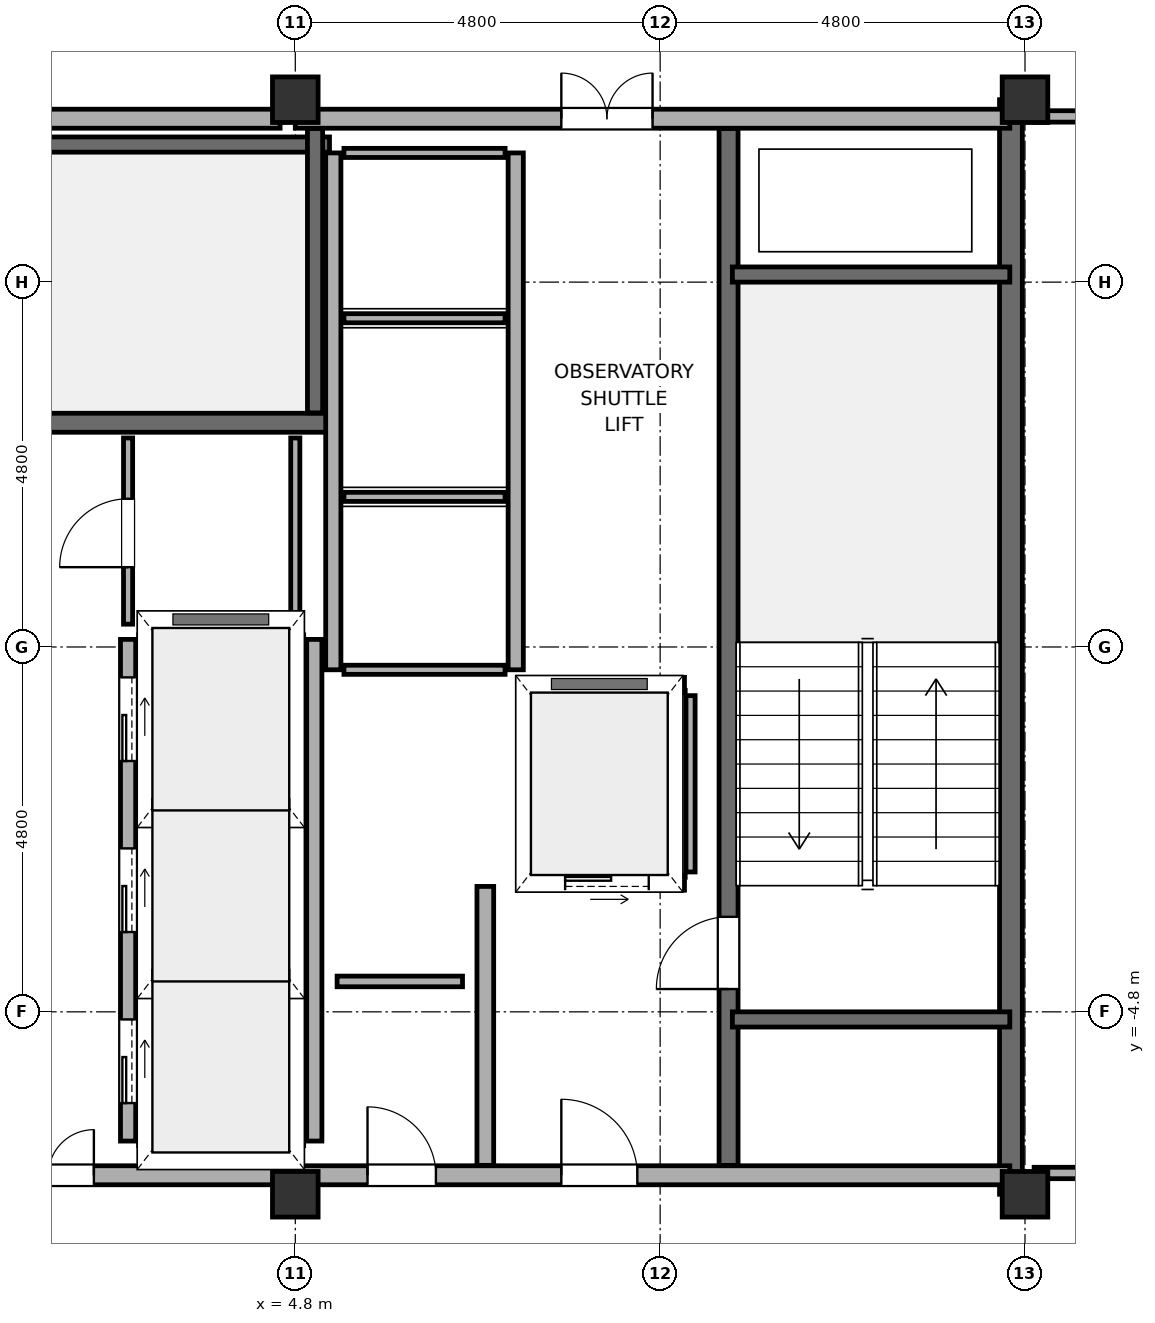
"""IFC4 building model, lengths in metres.
Left out: names, types, materials, properties, quantities, classifications, styles, units other than length and angle.
Written with IfcOpenShell. Run it as: python <this file> out.ifc"""

import sys

from ifc_helpers import new_model, si_unit, direction, frame, frame_2d, origin, origin_2d, place, context, subcontext, project, spatial, rectangle, hollow_rectangle, extrude, element, fill, save


model = new_model("IFC4")
c1 = context("Model", 3, precision=1e-05, world=origin(), true_north=direction((0.0, 1.0)))
c2 = subcontext(c1, "Body", "Model", "MODEL_VIEW")
j1 = project(units=[si_unit("LENGTHUNIT", "METRE"), si_unit("PLANEANGLEUNIT", "RADIAN")], contexts=[c1])
p1 = place(None, origin())
s1 = spatial("IfcSite", under=j1, at=p1, CompositionType="ELEMENT")
p2 = place(p1, origin())
s2 = spatial("IfcBuilding", under=s1, at=p2, CompositionType="ELEMENT")
p3 = place(p2, frame((0.0, 0.0, 249.25)))
s3 = spatial("IfcBuildingStorey", under=s2, at=p3, CompositionType="ELEMENT", Elevation=249.25)
for number, where, z_axis, x_axis in (
    (1, (4.8, -7.2, 0.0), (0.0, 0.0, 1.0), (1.0, 0.0, 0.0)),
    (2, (4.8, 7.2, 0.0), (0.0, 0.0, 1.0), (1.0, 0.0, 0.0)),
    (3, (14.4, -7.2, 0.0), (0.0, 0.0, 1.0), (1.0, 0.0, 0.0)),
    (4, (14.4, 7.2, 0.0), (0.0, 0.0, 1.0), (1.0, 0.0, 0.0)),
):
    element("IfcColumn", number, at=place(p3, frame(where, z_axis=z_axis, x_axis=x_axis)), inside=s3, PredefinedType="COLUMN", context=c2, shape_type="SweptSolid", body=[
        extrude(hollow_rectangle(XDim=0.6, YDim=0.6, WallThickness=0.028, at=origin_2d()), origin(), (0.0, 0.0, 1.0), 3.85),
    ])
p4 = place(p3, frame((14.215, -7.2, -0.18), z_axis=(0.0, 0.0, 1.0), x_axis=(0.0, 1.0, 0.0)))
e5 = element("IfcWall", 5, at=p4, inside=s3, PredefinedType="SHEAR", context=c2, shape_type="SweptSolid", body=[
    extrude(rectangle(XDim=14.4, YDim=0.3, at=frame_2d((7.2, 0.0))), origin(), (0.0, 0.0, 1.0), 3.85),
])
p5 = place(p3, frame((-4.6, -6.95, 0.0), z_axis=(0.0, 0.0, 1.0), x_axis=(1.0, 0.0, 0.0)))
e6 = element("IfcWall", 6, at=p5, inside=s3, PredefinedType="SOLIDWALL", context=c2, shape_type="SweptSolid", body=[
    extrude(rectangle(XDim=9.2, YDim=0.25, at=frame_2d((4.6, 0.0))), origin(), (0.0, 0.0, 1.0), 2.47),
])
p6 = place(p5, frame((0.8, 0.0, 0.0)))
e7 = element("IfcOpeningElement", 7, at=p6, cuts=e6, PredefinedType="OPENING", context=c2, shape_type="SweptSolid", body=[
    extrude(rectangle(XDim=1.2, YDim=2.2, at=frame_2d((0.6, 1.1))), frame((0.0, 0.14, 0.0), z_axis=(0.0, -1.0, 0.0), x_axis=(1.0, 0.0, 0.0)), (0.0, 0.0, 1.0), 0.28),
])
p7 = place(p5, frame((5.55, 0.0, 0.0)))
e8 = element("IfcOpeningElement", 8, at=p7, cuts=e6, PredefinedType="OPENING", context=c2, shape_type="SweptSolid", body=[
    extrude(rectangle(XDim=1.2, YDim=2.2, at=frame_2d((0.6, 1.1))), frame((0.0, 0.14, 0.0), z_axis=(0.0, -1.0, 0.0), x_axis=(1.0, 0.0, 0.0)), (0.0, 0.0, 1.0), 0.28),
])
p8 = place(p3, frame((4.8, -6.95, 0.0), z_axis=(0.0, 0.0, 1.0), x_axis=(1.0, 0.0, 0.0)))
e9 = element("IfcWall", 9, at=p8, inside=s3, PredefinedType="SOLIDWALL", context=c2, shape_type="SweptSolid", body=[
    extrude(rectangle(XDim=9.4, YDim=0.25, at=frame_2d((4.7, 0.0))), origin(), (0.0, 0.0, 1.0), 2.27),
])
p9 = place(p8, frame((3.5, 0.0, 0.0)))
e10 = element("IfcOpeningElement", 10, at=p9, cuts=e9, PredefinedType="OPENING", context=c2, shape_type="SweptSolid", body=[
    extrude(rectangle(XDim=1.0, YDim=2.15, at=frame_2d((0.5, 1.075))), frame((0.0, 0.14, 0.0), z_axis=(0.0, -1.0, 0.0), x_axis=(1.0, 0.0, 0.0)), (0.0, 0.0, 1.0), 0.28),
])
p10 = place(p8, frame((0.95, 0.0, 0.0)))
e11 = element("IfcOpeningElement", 11, at=p10, cuts=e9, PredefinedType="OPENING", context=c2, shape_type="SweptSolid", body=[
    extrude(rectangle(XDim=0.9, YDim=2.1, at=frame_2d((0.45, 1.05))), frame((0.0, 0.14, 0.0), z_axis=(0.0, -1.0, 0.0), x_axis=(1.0, 0.0, 0.0)), (0.0, 0.0, 1.0), 0.28),
])
p11 = place(p3, frame((-4.6, 6.95, 0.0), z_axis=(0.0, 0.0, 1.0), x_axis=(1.0, 0.0, 0.0)))
e12 = element("IfcWall", 12, at=p11, inside=s3, PredefinedType="SOLIDWALL", context=c2, shape_type="SweptSolid", body=[
    extrude(rectangle(XDim=9.2, YDim=0.25, at=frame_2d((4.6, 0.0))), origin(), (0.0, 0.0, 1.0), 2.27),
])
p12 = place(p3, frame((4.8, 6.95, 0.0), z_axis=(0.0, 0.0, 1.0), x_axis=(1.0, 0.0, 0.0)))
e13 = element("IfcWall", 13, at=p12, inside=s3, PredefinedType="SOLIDWALL", context=c2, shape_type="SweptSolid", body=[
    extrude(rectangle(XDim=9.4, YDim=0.25, at=frame_2d((4.7, 0.0))), origin(), (0.0, 0.0, 1.0), 2.27),
])
p13 = place(p12, frame((3.5, 0.0, 0.0)))
e14 = element("IfcOpeningElement", 14, at=p13, cuts=e13, PredefinedType="OPENING", context=c2, shape_type="SweptSolid", body=[
    extrude(rectangle(XDim=1.2, YDim=2.2, at=frame_2d((0.6, 1.1))), frame((0.0, 0.14, 0.0), z_axis=(0.0, -1.0, 0.0), x_axis=(1.0, 0.0, 0.0)), (0.0, 0.0, 1.0), 0.28),
])
p14 = place(p3, frame((7.3, -6.82, 0.0), z_axis=(0.0, 0.0, 1.0), x_axis=(0.0, 1.0, 0.0)))
e15 = element("IfcWall", 15, at=p14, inside=s3, PredefinedType="SOLIDWALL", context=c2, shape_type="SweptSolid", body=[
    extrude(rectangle(XDim=3.67, YDim=0.22, at=frame_2d((1.835, 0.0))), origin(), (0.0, 0.0, 1.0), 2.27),
])
p15 = place(p3, frame((10.5, -6.82, -0.18), z_axis=(0.0, 0.0, 1.0), x_axis=(0.0, 1.0, 0.0)))
e16 = element("IfcWall", 16, at=p15, inside=s3, PredefinedType="SOLIDWALL", context=c2, shape_type="SweptSolid", body=[
    extrude(rectangle(XDim=13.64, YDim=0.25, at=frame_2d((6.82, 0.0))), origin(), (0.0, 0.0, 1.0), 3.85),
])
p16 = place(p15, frame((2.32, 0.0, 0.18)))
e17 = element("IfcOpeningElement", 17, at=p16, cuts=e16, PredefinedType="OPENING", context=c2, shape_type="SweptSolid", body=[
    extrude(rectangle(XDim=0.95, YDim=2.15, at=frame_2d((0.475, 1.075))), frame((0.0, 0.14, 0.0), z_axis=(0.0, -1.0, 0.0), x_axis=(1.0, 0.0, 0.0)), (0.0, 0.0, 1.0), 0.28),
])
for number, where, z_axis, x_axis in (
    (18, (10.55, -4.9, -0.18), (0.0, 0.0, 1.0), (1.0, 0.0, 0.0)),
    (19, (10.55, 4.9, -0.18), (0.0, 0.0, 1.0), (1.0, 0.0, 0.0)),
):
    element("IfcWall", number, at=place(p3, frame(where, z_axis=z_axis, x_axis=x_axis)), inside=s3, PredefinedType="SOLIDWALL", context=c2, shape_type="SweptSolid", body=[
        extrude(rectangle(XDim=3.65, YDim=0.2, at=frame_2d((1.825, 0.0))), origin(), (0.0, 0.0, 1.0), 3.85),
    ])
p17 = place(p3, frame((-4.65, 2.95, -0.18), z_axis=(0.0, 0.0, 1.0), x_axis=(1.0, 0.0, 0.0)))
e20 = element("IfcWall", 20, at=p17, inside=s3, PredefinedType="SOLIDWALL", context=c2, shape_type="SweptSolid", body=[
    extrude(rectangle(XDim=9.9, YDim=0.25, at=frame_2d((4.95, 0.0))), origin(), (0.0, 0.0, 1.0), 3.85),
])
p18 = place(p17, frame((0.65, 0.0, 0.18)))
e21 = element("IfcOpeningElement", 21, at=p18, cuts=e20, PredefinedType="OPENING", context=c2, shape_type="SweptSolid", body=[
    extrude(rectangle(XDim=0.95, YDim=2.15, at=frame_2d((0.475, 1.075))), frame((0.0, 0.14, 0.0), z_axis=(0.0, -1.0, 0.0), x_axis=(1.0, 0.0, 0.0)), (0.0, 0.0, 1.0), 0.28),
])
p19 = place(p3, frame((-4.65, 6.61, -0.18), z_axis=(0.0, 0.0, 1.0), x_axis=(1.0, 0.0, 0.0)))
e22 = element("IfcWall", 22, at=p19, inside=s3, PredefinedType="SOLIDWALL", context=c2, shape_type="SweptSolid", body=[
    extrude(rectangle(XDim=9.9, YDim=0.2, at=frame_2d((4.95, 0.0))), origin(), (0.0, 0.0, 1.0), 3.85),
])
p20 = place(p3, frame((5.06, 3.08, -0.18), z_axis=(0.0, 0.0, 1.0), x_axis=(0.0, 1.0, 0.0)))
e23 = element("IfcWall", 23, at=p20, inside=s3, PredefinedType="SOLIDWALL", context=c2, shape_type="SweptSolid", body=[
    extrude(rectangle(XDim=3.74, YDim=0.2, at=frame_2d((1.87, 0.0))), origin(), (0.0, 0.0, 1.0), 3.85),
])
p21 = place(p3, frame((2.6, -6.5, 0.0), z_axis=(0.0, 0.0, 1.0), x_axis=(0.0, 1.0, 0.0)))
e24 = element("IfcWall", 24, at=p21, inside=s3, PredefinedType="SOLIDWALL", context=c2, shape_type="SweptSolid", body=[
    extrude(rectangle(XDim=6.6, YDim=0.2, at=frame_2d((3.3, 0.0))), origin(), (0.0, 0.0, 1.0), 3.67),
])
p22 = place(p21, frame((0.5, 0.0, 0.0)))
e25 = element("IfcOpeningElement", 25, at=p22, cuts=e24, PredefinedType="OPENING", context=c2, shape_type="SweptSolid", body=[
    extrude(rectangle(XDim=1.1, YDim=2.2, at=frame_2d((0.55, 1.1))), frame((0.0, 0.115, 0.0), z_axis=(0.0, -1.0, 0.0), x_axis=(1.0, 0.0, 0.0)), (0.0, 0.0, 1.0), 0.23),
])
p23 = place(p21, frame((2.75, 0.0, 0.0)))
e26 = element("IfcOpeningElement", 26, at=p23, cuts=e24, PredefinedType="OPENING", context=c2, shape_type="SweptSolid", body=[
    extrude(rectangle(XDim=1.1, YDim=2.2, at=frame_2d((0.55, 1.1))), frame((0.0, 0.115, 0.0), z_axis=(0.0, -1.0, 0.0), x_axis=(1.0, 0.0, 0.0)), (0.0, 0.0, 1.0), 0.23),
])
p24 = place(p21, frame((5.0, 0.0, 0.0)))
e27 = element("IfcOpeningElement", 27, at=p24, cuts=e24, PredefinedType="OPENING", context=c2, shape_type="SweptSolid", body=[
    extrude(rectangle(XDim=1.1, YDim=2.2, at=frame_2d((0.55, 1.1))), frame((0.0, 0.115, 0.0), z_axis=(0.0, -1.0, 0.0), x_axis=(1.0, 0.0, 0.0)), (0.0, 0.0, 1.0), 0.23),
])
p25 = place(p3, frame((5.05, -6.5, 0.0), z_axis=(0.0, 0.0, 1.0), x_axis=(0.0, 1.0, 0.0)))
e28 = element("IfcWall", 28, at=p25, inside=s3, PredefinedType="SOLIDWALL", context=c2, shape_type="SweptSolid", body=[
    extrude(rectangle(XDim=6.6, YDim=0.2, at=frame_2d((3.3, 0.0))), origin(), (0.0, 0.0, 1.0), 3.67),
])
for number, where, z_axis, x_axis in (
    (29, (2.74, -6.5, 0.0), (0.0, 0.0, 1.0), (1.0, 0.0, 0.0)),
    (30, (2.74, -4.325, 0.0), (0.0, 0.0, 1.0), (1.0, 0.0, 0.0)),
    (31, (2.74, -2.075, 0.0), (0.0, 0.0, 1.0), (1.0, 0.0, 0.0)),
    (32, (2.74, 0.1, 0.0), (0.0, 0.0, 1.0), (1.0, 0.0, 0.0)),
):
    element("IfcWall", number, at=place(p3, frame(where, z_axis=z_axis, x_axis=x_axis)), inside=s3, PredefinedType="PARTITIONING", context=c2, shape_type="SweptSolid", body=[
        extrude(rectangle(XDim=2.17, YDim=0.12, at=frame_2d((1.085, 0.0))), origin(), (0.0, 0.0, 1.0), 3.67),
    ])
for number, where, z_axis, x_axis in (
    (33, (7.7, -0.3, 0.0), (0.0, 0.0, 1.0), (0.0, 1.0, 0.0)),
    (34, (5.3, -0.3, 0.0), (0.0, 0.0, 1.0), (0.0, 1.0, 0.0)),
):
    element("IfcWall", number, at=place(p3, frame(where, z_axis=z_axis, x_axis=x_axis)), inside=s3, PredefinedType="SOLIDWALL", context=c2, shape_type="SweptSolid", body=[
        extrude(rectangle(XDim=6.8, YDim=0.2, at=frame_2d((3.4, 0.0))), origin(), (0.0, 0.0, 1.0), 3.67),
    ])
for number, where, z_axis, x_axis in (
    (35, (5.44, -0.3, 0.0), (0.0, 0.0, 1.0), (1.0, 0.0, 0.0)),
    (36, (5.44, 1.975, 0.0), (0.0, 0.0, 1.0), (1.0, 0.0, 0.0)),
    (37, (5.44, 4.325, 0.0), (0.0, 0.0, 1.0), (1.0, 0.0, 0.0)),
    (38, (5.44, 6.5, 0.0), (0.0, 0.0, 1.0), (1.0, 0.0, 0.0)),
):
    element("IfcWall", number, at=place(p3, frame(where, z_axis=z_axis, x_axis=x_axis)), inside=s3, PredefinedType="PARTITIONING", context=c2, shape_type="SweptSolid", body=[
        extrude(rectangle(XDim=2.12, YDim=0.12, at=frame_2d((1.06, 0.0))), origin(), (0.0, 0.0, 1.0), 3.67),
    ])
p26 = place(p3, frame((7.88, -3.1, 0.0), z_axis=(0.0, 0.0, 1.0), x_axis=(1.0, 0.0, 0.0)))
e39 = element("IfcWall", 39, at=p26, inside=s3, PredefinedType="SOLIDWALL", context=c2, shape_type="SweptSolid", body=[
    extrude(rectangle(XDim=2.04, YDim=0.2, at=frame_2d((1.02, 0.0))), origin(), (0.0, 0.0, 1.0), 3.67),
])
p27 = place(p26, frame((0.47, 0.0, 0.0)))
e40 = element("IfcOpeningElement", 40, at=p27, cuts=e39, PredefinedType="OPENING", context=c2, shape_type="SweptSolid", body=[
    extrude(rectangle(XDim=1.1, YDim=2.2, at=frame_2d((0.55, 1.1))), frame((0.0, 0.115, 0.0), z_axis=(0.0, -1.0, 0.0), x_axis=(1.0, 0.0, 0.0)), (0.0, 0.0, 1.0), 0.23),
])
p28 = place(p3, frame((7.88, -0.5, 0.0), z_axis=(0.0, 0.0, 1.0), x_axis=(1.0, 0.0, 0.0)))
e41 = element("IfcWall", 41, at=p28, inside=s3, PredefinedType="SOLIDWALL", context=c2, shape_type="SweptSolid", body=[
    extrude(rectangle(XDim=2.04, YDim=0.2, at=frame_2d((1.02, 0.0))), origin(), (0.0, 0.0, 1.0), 3.67),
])
for number, where, z_axis, x_axis in (
    (42, (7.8, -2.96, 0.0), (0.0, 0.0, 1.0), (0.0, 1.0, 0.0)),
    (43, (10.0, -2.96, 0.0), (0.0, 0.0, 1.0), (0.0, 1.0, 0.0)),
):
    element("IfcWall", number, at=place(p3, frame(where, z_axis=z_axis, x_axis=x_axis)), inside=s3, PredefinedType="PARTITIONING", context=c2, shape_type="SweptSolid", body=[
        extrude(rectangle(XDim=2.32, YDim=0.12, at=frame_2d((1.16, 0.0))), origin(), (0.0, 0.0, 1.0), 3.67),
    ])
p29 = place(p3, frame((14.52, -6.92, 0.0), z_axis=(0.0, 0.0, 1.0), x_axis=(1.0, 0.0, 0.0)))
e44 = element("IfcWall", 44, at=p29, inside=s3, PredefinedType="PARTITIONING", context=c2, shape_type="SweptSolid", body=[
    extrude(rectangle(XDim=9.4, YDim=0.15, at=frame_2d((4.7, 0.0))), origin(), (0.0, 0.0, 1.0), 2.27),
])
p30 = place(p3, frame((5.35, -4.4, 0.0), z_axis=(0.0, 0.0, 1.0), x_axis=(1.0, 0.0, 0.0)))
e45 = element("IfcWall", 45, at=p30, inside=s3, PredefinedType="PLUMBINGWALL", context=c2, shape_type="SweptSolid", body=[
    extrude(rectangle(XDim=1.65, YDim=0.14, at=frame_2d((0.825, 0.0))), origin(), (0.0, 0.0, 1.0), 3.67),
])
p31 = place(p3, frame((14.52, 6.98, 0.0), z_axis=(0.0, 0.0, 1.0), x_axis=(1.0, 0.0, 0.0)))
e46 = element("IfcWall", 46, at=p31, inside=s3, PredefinedType="PARTITIONING", context=c2, shape_type="SweptSolid", body=[
    extrude(rectangle(XDim=9.4, YDim=0.15, at=frame_2d((4.7, 0.0))), origin(), (0.0, 0.0, 1.0), 2.27),
])
p32 = place(p3, frame((2.6, 0.3, 0.0), z_axis=(0.0, 0.0, 1.0), x_axis=(0.0, 1.0, 0.0)))
e47 = element("IfcWall", 47, at=p32, inside=s3, PredefinedType="PARTITIONING", context=c2, shape_type="SweptSolid", body=[
    extrude(rectangle(XDim=2.45, YDim=0.12, at=frame_2d((1.225, 0.0))), origin(), (0.0, 0.0, 1.0), 3.67),
])
p33 = place(p32, frame((0.75, 0.0, 0.0)))
e48 = element("IfcOpeningElement", 48, at=p33, cuts=e47, PredefinedType="OPENING", context=c2, shape_type="SweptSolid", body=[
    extrude(rectangle(XDim=0.9, YDim=2.1, at=frame_2d((0.45, 1.05))), frame((0.0, 0.075, 0.0), z_axis=(0.0, -1.0, 0.0), x_axis=(1.0, 0.0, 0.0)), (0.0, 0.0, 1.0), 0.15),
])
p34 = place(p3, frame((4.8, 0.3, 0.0), z_axis=(0.0, 0.0, 1.0), x_axis=(0.0, 1.0, 0.0)))
e49 = element("IfcWall", 49, at=p34, inside=s3, PredefinedType="PARTITIONING", context=c2, shape_type="SweptSolid", body=[
    extrude(rectangle(XDim=2.45, YDim=0.12, at=frame_2d((1.225, 0.0))), origin(), (0.0, 0.0, 1.0), 3.67),
])
p35 = place(p9, origin())
e50 = element("IfcDoor", 50, at=p35, inside=s3, OperationType="SINGLE_SWING_RIGHT", PredefinedType="DOOR", context=c2, shape_type="SweptSolid", body=[
    extrude(rectangle(XDim=1.0, YDim=2.15, at=frame_2d((0.5, 1.075))), frame((0.0, 0.025, 0.0), z_axis=(0.0, -1.0, 0.0), x_axis=(1.0, 0.0, 0.0)), (0.0, 0.0, 1.0), 0.05),
])
fill(e10, e50)
p36 = place(p7, origin())
e51 = element("IfcDoor", 51, at=p36, inside=s3, OperationType="DOUBLE_DOOR_SINGLE_SWING", PredefinedType="DOOR", context=c2, shape_type="SweptSolid", body=[
    extrude(rectangle(XDim=1.2, YDim=2.2, at=frame_2d((0.6, 1.1))), frame((0.0, 0.025, 0.0), z_axis=(0.0, -1.0, 0.0), x_axis=(1.0, 0.0, 0.0)), (0.0, 0.0, 1.0), 0.05),
])
fill(e8, e51)
p37 = place(p13, origin())
e52 = element("IfcDoor", 52, at=p37, inside=s3, OperationType="DOUBLE_DOOR_SINGLE_SWING", PredefinedType="DOOR", context=c2, shape_type="SweptSolid", body=[
    extrude(rectangle(XDim=1.2, YDim=2.2, at=frame_2d((0.6, 1.1))), frame((0.0, 0.025, 0.0), z_axis=(0.0, -1.0, 0.0), x_axis=(1.0, 0.0, 0.0)), (0.0, 0.0, 1.0), 0.05),
])
fill(e14, e52)
p38 = place(p16, origin())
e53 = element("IfcDoor", 53, at=p38, inside=s3, OperationType="SINGLE_SWING_LEFT", PredefinedType="DOOR", context=c2, shape_type="SweptSolid", body=[
    extrude(rectangle(XDim=0.95, YDim=2.15, at=frame_2d((0.475, 1.075))), frame((0.0, 0.025, 0.0), z_axis=(0.0, -1.0, 0.0), x_axis=(1.0, 0.0, 0.0)), (0.0, 0.0, 1.0), 0.05),
])
fill(e17, e53)
p39 = place(p22, origin())
e54 = element("IfcDoor", 54, at=p39, inside=s3, OperationType="SLIDING_TO_LEFT", PredefinedType="DOOR", context=c2, shape_type="SweptSolid", body=[
    extrude(rectangle(XDim=1.1, YDim=2.2, at=frame_2d((0.55, 1.1))), frame((0.0, 0.025, 0.0), z_axis=(0.0, -1.0, 0.0), x_axis=(1.0, 0.0, 0.0)), (0.0, 0.0, 1.0), 0.05),
])
fill(e25, e54)
p40 = place(p23, origin())
e55 = element("IfcDoor", 55, at=p40, inside=s3, OperationType="SLIDING_TO_LEFT", PredefinedType="DOOR", context=c2, shape_type="SweptSolid", body=[
    extrude(rectangle(XDim=1.1, YDim=2.2, at=frame_2d((0.55, 1.1))), frame((0.0, 0.025, 0.0), z_axis=(0.0, -1.0, 0.0), x_axis=(1.0, 0.0, 0.0)), (0.0, 0.0, 1.0), 0.05),
])
fill(e26, e55)
p41 = place(p24, origin())
e56 = element("IfcDoor", 56, at=p41, inside=s3, OperationType="SLIDING_TO_LEFT", PredefinedType="DOOR", context=c2, shape_type="SweptSolid", body=[
    extrude(rectangle(XDim=1.1, YDim=2.2, at=frame_2d((0.55, 1.1))), frame((0.0, 0.025, 0.0), z_axis=(0.0, -1.0, 0.0), x_axis=(1.0, 0.0, 0.0)), (0.0, 0.0, 1.0), 0.05),
])
fill(e27, e56)
p42 = place(p27, origin())
e57 = element("IfcDoor", 57, at=p42, inside=s3, OperationType="SLIDING_TO_LEFT", PredefinedType="DOOR", context=c2, shape_type="SweptSolid", body=[
    extrude(rectangle(XDim=1.1, YDim=2.2, at=frame_2d((0.55, 1.1))), frame((0.0, 0.025, 0.0), z_axis=(0.0, -1.0, 0.0), x_axis=(1.0, 0.0, 0.0)), (0.0, 0.0, 1.0), 0.05),
])
fill(e40, e57)
p43 = place(p33, origin())
e58 = element("IfcDoor", 58, at=p43, inside=s3, OperationType="SINGLE_SWING_LEFT", PredefinedType="DOOR", context=c2, shape_type="SweptSolid", body=[
    extrude(rectangle(XDim=0.9, YDim=2.1, at=frame_2d((0.45, 1.05))), frame((0.0, 0.025, 0.0), z_axis=(0.0, -1.0, 0.0), x_axis=(1.0, 0.0, 0.0)), (0.0, 0.0, 1.0), 0.05),
])
fill(e48, e58)
p44 = place(p10, origin())
e59 = element("IfcDoor", 59, at=p44, inside=s3, OperationType="SINGLE_SWING_LEFT", PredefinedType="DOOR", context=c2, shape_type="SweptSolid", body=[
    extrude(rectangle(XDim=0.9, YDim=2.1, at=frame_2d((0.45, 1.05))), frame((0.0, 0.025, 0.0), z_axis=(0.0, -1.0, 0.0), x_axis=(1.0, 0.0, 0.0)), (0.0, 0.0, 1.0), 0.05),
])
fill(e11, e59)
save(model, sys.argv[1])
